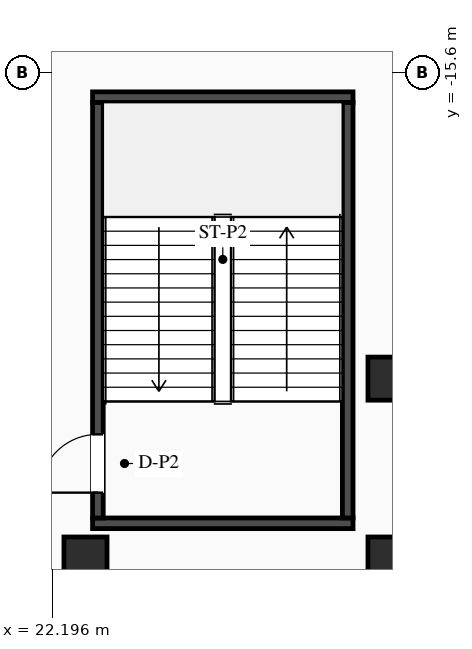
"""IFC4 building model, lengths in metres.
Left out: names, types, materials, properties, quantities, classifications, styles, units other than length and angle.
Written with IfcOpenShell. Run it as: python <this file> out.ifc"""

import sys

from ifc_helpers import new_model, si_unit, direction, frame, frame_2d, origin, origin_2d, place, context, subcontext, project, spatial, rectangle, i_section, extrude, element, fill, save


model = new_model("IFC4")
c1 = context("Model", 3, precision=1e-05, world=origin(), true_north=direction((0.0, 1.0)))
c2 = subcontext(c1, "Body", "Model", "MODEL_VIEW")
j1 = project(units=[si_unit("LENGTHUNIT", "METRE"), si_unit("PLANEANGLEUNIT", "RADIAN")], contexts=[c1])
p1 = place(None, origin())
s1 = spatial("IfcSite", under=j1, at=p1, CompositionType="ELEMENT")
p2 = place(p1, origin())
s2 = spatial("IfcBuilding", under=s1, at=p2, CompositionType="ELEMENT")
p3 = place(p2, origin())
s3 = spatial("IfcBuildingStorey", under=s2, at=p3, CompositionType="ELEMENT", Elevation=0.0)
for number, where, z_axis, x_axis in (
    (1, (22.99, -24.505, 0.0), (0.0, 0.0, 1.0), (1.0, 0.0, 0.0)),
    (2, (22.99, -16.095, 0.0), (0.0, 0.0, 1.0), (1.0, 0.0, 0.0)),
):
    element("IfcWall", number, at=place(p3, frame(where, z_axis=z_axis, x_axis=x_axis)), inside=s3, PredefinedType="SHEAR", context=c2, shape_type="SweptSolid", body=[
        extrude(rectangle(XDim=5.14, YDim=0.21, at=frame_2d((2.57, 0.0))), origin(), (0.0, 0.0, 1.0), 4.85),
    ])
p4 = place(p3, frame((23.095, -24.4, 0.0), z_axis=(0.0, 0.0, 1.0), x_axis=(0.0, 1.0, 0.0)))
e3 = element("IfcWall", 3, at=p4, inside=s3, PredefinedType="SHEAR", context=c2, shape_type="SweptSolid", body=[
    extrude(rectangle(XDim=8.2, YDim=0.21, at=frame_2d((4.1, 0.0))), origin(), (0.0, 0.0, 1.0), 4.85),
])
p5 = place(p4, frame((0.5, 0.0, 0.0)))
e4 = element("IfcOpeningElement", 4, at=p5, cuts=e3, PredefinedType="OPENING", context=c2, shape_type="SweptSolid", body=[
    extrude(rectangle(XDim=1.15, YDim=2.1, at=frame_2d((0.575, 1.05))), frame((0.0, 0.115, 0.0), z_axis=(0.0, -1.0, 0.0), x_axis=(1.0, 0.0, 0.0)), (0.0, 0.0, 1.0), 0.23),
])
p6 = place(p3, frame((28.025, -24.4, 0.0), z_axis=(0.0, 0.0, 1.0), x_axis=(0.0, 1.0, 0.0)))
e5 = element("IfcWall", 5, at=p6, inside=s3, PredefinedType="SHEAR", context=c2, shape_type="SweptSolid", body=[
    extrude(rectangle(XDim=8.2, YDim=0.21, at=frame_2d((4.1, 0.0))), origin(), (0.0, 0.0, 1.0), 4.85),
])
for number, where, z_axis, x_axis in (
    (6, (28.85, -21.65, 0.0), (0.0, 0.0, 1.0), (1.0, 0.0, 0.0)),
    (7, (22.85, -25.2, 0.0), (0.0, 0.0, 1.0), (1.0, 0.0, 0.0)),
    (8, (28.85, -25.2, 0.0), (0.0, 0.0, 1.0), (1.0, 0.0, 0.0)),
):
    element("IfcColumn", number, at=place(p3, frame(where, z_axis=z_axis, x_axis=x_axis)), inside=s3, PredefinedType="COLUMN", context=c2, shape_type="SweptSolid", body=[
        extrude(i_section(OverallWidth=0.85, OverallDepth=0.85, WebThickness=0.032, FlangeThickness=0.048, at=origin_2d()), origin(), (0.0, 0.0, 1.0), 5.1),
    ])
p7 = place(p5, origin())
e9 = element("IfcDoor", 9, at=p7, inside=s3, OperationType="SINGLE_SWING_LEFT", PredefinedType="DOOR", context=c2, shape_type="SweptSolid", body=[
    extrude(rectangle(XDim=1.15, YDim=2.1, at=frame_2d((0.575, 1.05))), frame((0.0, 0.025, 0.0), z_axis=(0.0, -1.0, 0.0), x_axis=(1.0, 0.0, 0.0)), (0.0, 0.0, 1.0), 0.05),
])
fill(e4, e9)
save(model, sys.argv[1])
